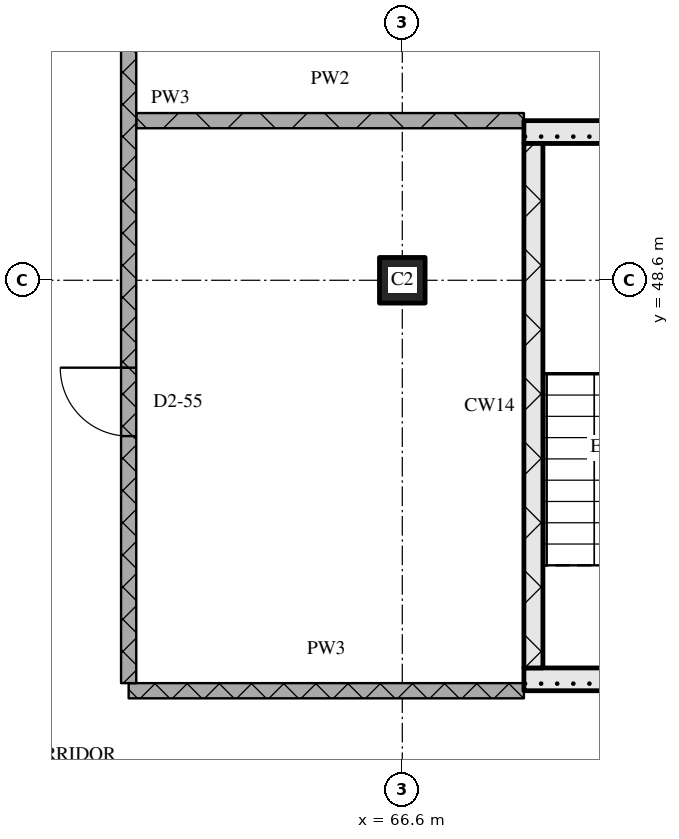
"""IFC4 building model, lengths in metres.
Left out: names, types, materials, properties, quantities, classifications, styles, units other than length and angle.
Written with IfcOpenShell. Run it as: python <this file> out.ifc"""

import sys

from ifc_helpers import new_model, si_unit, direction, frame, frame_2d, origin, origin_2d, place, context, subcontext, project, spatial, rectangle, extrude, element, fill, save


model = new_model("IFC4")
c1 = context("Model", 3, precision=1e-05, world=origin(), true_north=direction((0.0, 1.0)))
c2 = subcontext(c1, "Body", "Model", "MODEL_VIEW")
j1 = project(units=[si_unit("LENGTHUNIT", "METRE"), si_unit("PLANEANGLEUNIT", "RADIAN")], contexts=[c1])
p1 = place(None, origin())
s1 = spatial("IfcSite", under=j1, at=p1, CompositionType="ELEMENT")
p2 = place(p1, origin())
s2 = spatial("IfcBuilding", under=s1, at=p2, CompositionType="ELEMENT")
p3 = place(p2, frame((0.0, 0.0, 219.9)))
s3 = spatial("IfcBuildingStorey", under=s2, at=p3, CompositionType="ELEMENT", Elevation=219.9)
p4 = place(p3, frame((66.6, 48.6, 0.0), z_axis=(0.0, 0.0, 1.0), x_axis=(1.0, 0.0, 0.0)))
e1 = element("IfcColumn", 1, at=p4, inside=s3, PredefinedType="COLUMN", context=c2, shape_type="SweptSolid", body=[
    extrude(rectangle(XDim=0.6, YDim=0.6, at=origin_2d()), origin(), (0.0, 0.0, 1.0), 3.6),
])
p5 = place(p3, frame((68.2, 43.35, 0.0), z_axis=(0.0, 0.0, 1.0), x_axis=(1.0, 0.0, 0.0)))
e2 = element("IfcWall", 2, at=p5, inside=s3, PredefinedType="SOLIDWALL", context=c2, shape_type="SweptSolid", body=[
    extrude(rectangle(XDim=5.6, YDim=0.3, at=frame_2d((2.8, 0.0))), origin(), (0.0, 0.0, 1.0), 3.32),
])
p6 = place(p5, frame((3.875, 0.0, 0.0)))
e3 = element("IfcOpeningElement", 3, at=p6, cuts=e2, PredefinedType="OPENING", context=c2, shape_type="SweptSolid", body=[
    extrude(rectangle(XDim=1.0, YDim=2.1, at=frame_2d((0.5, 1.05))), frame((0.0, 0.16, 0.0), z_axis=(0.0, -1.0, 0.0), x_axis=(1.0, 0.0, 0.0)), (0.0, 0.0, 1.0), 0.32),
])
p7 = place(p3, frame((68.325, 43.5, 0.0), z_axis=(0.0, 0.0, 1.0), x_axis=(0.0, 1.0, 0.0)))
e4 = element("IfcWall", 4, at=p7, inside=s3, PredefinedType="SOLIDWALL", context=c2, shape_type="SweptSolid", body=[
    extrude(rectangle(XDim=6.9, YDim=0.25, at=frame_2d((3.45, 0.0))), origin(), (0.0, 0.0, 1.0), 3.32),
])
p8 = place(p3, frame((68.2, 50.55, 0.0), z_axis=(0.0, 0.0, 1.0), x_axis=(1.0, 0.0, 0.0)))
e5 = element("IfcWall", 5, at=p8, inside=s3, PredefinedType="SOLIDWALL", context=c2, shape_type="SweptSolid", body=[
    extrude(rectangle(XDim=5.6, YDim=0.3, at=frame_2d((2.8, 0.0))), origin(), (0.0, 0.0, 1.0), 3.32),
])
p9 = place(p3, frame((63.0, 43.2, 0.0), z_axis=(0.0, 0.0, 1.0), x_axis=(1.0, 0.0, 0.0)))
e6 = element("IfcWall", 6, at=p9, inside=s3, PredefinedType="PARTITIONING", context=c2, shape_type="SweptSolid", body=[
    extrude(rectangle(XDim=5.2, YDim=0.2, at=frame_2d((2.6, 0.0))), origin(), (0.0, 0.0, 1.0), 3.32),
])
p10 = place(p3, frame((63.1, 50.7, 0.0), z_axis=(0.0, 0.0, 1.0), x_axis=(1.0, 0.0, 0.0)))
e7 = element("IfcWall", 7, at=p10, inside=s3, PredefinedType="PARTITIONING", context=c2, shape_type="SweptSolid", body=[
    extrude(rectangle(XDim=5.1, YDim=0.2, at=frame_2d((2.55, 0.0))), origin(), (0.0, 0.0, 1.0), 3.32),
])
p11 = place(p3, frame((63.0, 58.7, 0.0), z_axis=(0.0, 0.0, 1.0), x_axis=(0.0, -1.0, 0.0)))
e8 = element("IfcWall", 8, at=p11, inside=s3, PredefinedType="PARTITIONING", context=c2, shape_type="SweptSolid", body=[
    extrude(rectangle(XDim=15.4, YDim=0.2, at=frame_2d((7.7, 0.0))), origin(), (0.0, 0.0, 1.0), 3.32),
])
p12 = place(p11, frame((3.45, 0.0, 0.0)))
e9 = element("IfcOpeningElement", 9, at=p12, cuts=e8, PredefinedType="OPENING", context=c2, shape_type="SweptSolid", body=[
    extrude(rectangle(XDim=1.0, YDim=2.1, at=frame_2d((0.5, 1.05))), frame((0.0, 0.11, 0.0), z_axis=(0.0, -1.0, 0.0), x_axis=(1.0, 0.0, 0.0)), (0.0, 0.0, 1.0), 0.22),
])
p13 = place(p11, frame((11.25, 0.0, 0.0)))
e10 = element("IfcOpeningElement", 10, at=p13, cuts=e8, PredefinedType="OPENING", context=c2, shape_type="SweptSolid", body=[
    extrude(rectangle(XDim=0.9, YDim=2.1, at=frame_2d((0.45, 1.05))), frame((0.0, 0.11, 0.0), z_axis=(0.0, -1.0, 0.0), x_axis=(1.0, 0.0, 0.0)), (0.0, 0.0, 1.0), 0.22),
])
p14 = place(p13, origin())
e11 = element("IfcDoor", 11, at=p14, inside=s3, OperationType="SINGLE_SWING_RIGHT", PredefinedType="DOOR", context=c2, shape_type="SweptSolid", body=[
    extrude(rectangle(XDim=0.9, YDim=2.1, at=frame_2d((0.45, 1.05))), frame((0.0, 0.025, 0.0), z_axis=(0.0, -1.0, 0.0), x_axis=(1.0, 0.0, 0.0)), (0.0, 0.0, 1.0), 0.05),
])
fill(e10, e11)
save(model, sys.argv[1])
